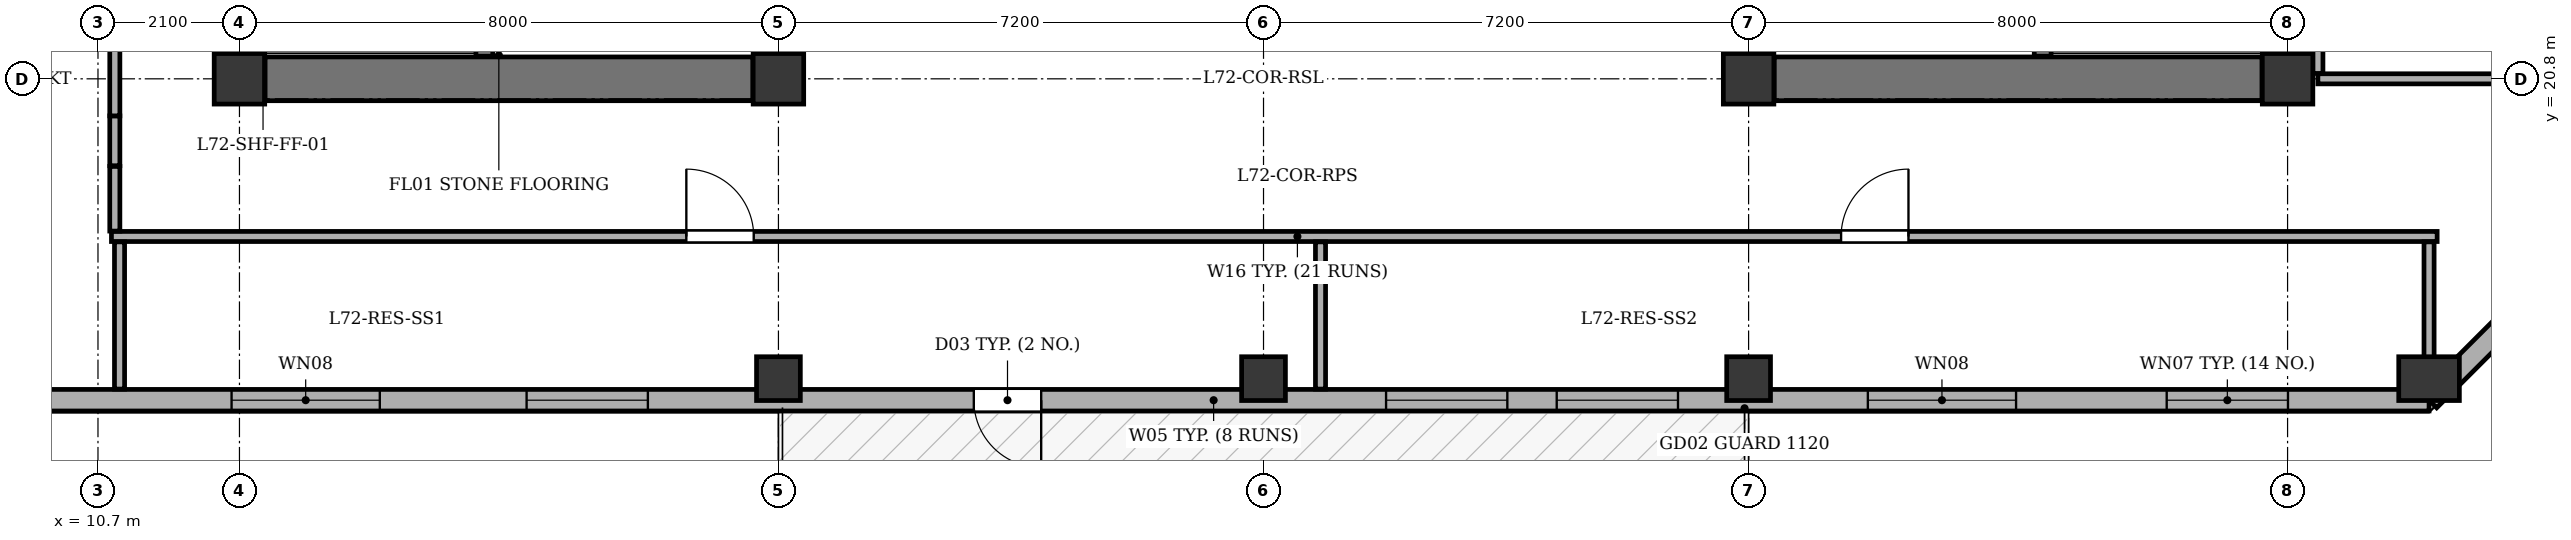
"""IFC4 building model, lengths in metres.
Left out: names, types, materials, properties, quantities, classifications, styles, units other than length and angle.
Written with IfcOpenShell. Run it as: python <this file> out.ifc"""

import sys

from ifc_helpers import new_model, si_unit, direction, frame, frame_2d, origin, origin_2d, place, context, subcontext, project, spatial, rectangle, extrude, element, fill, save


model = new_model("IFC4")
c1 = context("Model", 3, precision=1e-05, world=origin(), true_north=direction((0.0, 1.0)))
c2 = subcontext(c1, "Body", "Model", "MODEL_VIEW")
j1 = project(units=[si_unit("LENGTHUNIT", "METRE"), si_unit("PLANEANGLEUNIT", "RADIAN")], contexts=[c1])
p1 = place(None, origin())
s1 = spatial("IfcSite", under=j1, at=p1, CompositionType="ELEMENT")
p2 = place(p1, origin())
s2 = spatial("IfcBuilding", under=s1, at=p2, CompositionType="ELEMENT")
p3 = place(p2, frame((0.0, 0.0, 272.1)))
s3 = spatial("IfcBuildingStorey", under=s2, at=p3, CompositionType="ELEMENT", Elevation=272.1)
for number, where, z_axis, x_axis in (
    (1, (12.8, 20.8, 0.0), (0.0, 0.0, 1.0), (1.0, 0.0, 0.0)),
    (2, (20.8, 20.8, 0.0), (0.0, 0.0, 1.0), (1.0, 0.0, 0.0)),
    (3, (35.2, 20.8, 0.0), (0.0, 0.0, 1.0), (1.0, 0.0, 0.0)),
    (4, (43.2, 20.8, 0.0), (0.0, 0.0, 1.0), (1.0, 0.0, 0.0)),
):
    element("IfcColumn", number, at=place(p3, frame(where, z_axis=z_axis, x_axis=x_axis)), inside=s3, PredefinedType="COLUMN", context=c2, shape_type="SweptSolid", body=[
        extrude(rectangle(XDim=0.75, YDim=0.75, at=origin_2d()), origin(), (0.0, 0.0, 1.0), 3.4),
    ])
for number, where, z_axis, x_axis in (
    (5, (20.8, 16.35, 0.0), (0.0, 0.0, 1.0), (1.0, 0.0, 0.0)),
    (6, (28.0, 16.35, 0.0), (0.0, 0.0, 1.0), (1.0, 0.0, 0.0)),
    (7, (35.2, 16.35, 0.0), (0.0, 0.0, 1.0), (1.0, 0.0, 0.0)),
):
    element("IfcColumn", number, at=place(p3, frame(where, z_axis=z_axis, x_axis=x_axis)), inside=s3, PredefinedType="COLUMN", context=c2, shape_type="SweptSolid", body=[
        extrude(rectangle(XDim=0.65, YDim=0.65, at=origin_2d()), origin(), (0.0, 0.0, 1.0), 3.4),
    ])
p4 = place(p3, frame((45.3, 16.35, 0.0), z_axis=(0.0, 0.0, 1.0), x_axis=(1.0, 0.0, 0.0)))
e8 = element("IfcColumn", 8, at=p4, inside=s3, PredefinedType="COLUMN", context=c2, shape_type="SweptSolid", body=[
    extrude(rectangle(XDim=0.65, YDim=0.9, at=origin_2d()), origin(), (0.0, 0.0, 1.0), 3.4),
])
p5 = place(p3, frame((45.3, 16.03, 0.0), z_axis=(0.0, 0.0, 1.0), x_axis=(-1.0, 0.0, 0.0)))
e9 = element("IfcWall", 9, at=p5, inside=s3, PredefinedType="STANDARD", context=c2, shape_type="SweptSolid", body=[
    extrude(rectangle(XDim=37.0, YDim=0.32, at=frame_2d((18.5, 0.0))), origin(), (0.0, 0.0, 1.0), 2.725),
])
p6 = place(p5, frame((20.6, 0.0, 0.0)))
e10 = element("IfcOpeningElement", 10, at=p6, cuts=e9, PredefinedType="OPENING", context=c2, shape_type="SweptSolid", body=[
    extrude(rectangle(XDim=1.0, YDim=2.02, at=frame_2d((0.5, 1.01))), frame((0.0, 0.17, 0.0), z_axis=(0.0, -1.0, 0.0), x_axis=(1.0, 0.0, 0.0)), (0.0, 0.0, 1.0), 0.34),
])
p7 = place(p5, frame((2.094, 0.0, 0.75)))
e11 = element("IfcOpeningElement", 11, at=p7, cuts=e9, PredefinedType="OPENING", context=c2, shape_type="SweptSolid", body=[
    extrude(rectangle(XDim=1.8, YDim=1.7, at=frame_2d((0.9, 0.85))), frame((0.0, 0.17, 0.0), z_axis=(0.0, -1.0, 0.0), x_axis=(1.0, 0.0, 0.0)), (0.0, 0.0, 1.0), 0.34),
])
p8 = place(p5, frame((6.13, 0.0, 0.75)))
e12 = element("IfcOpeningElement", 12, at=p8, cuts=e9, PredefinedType="OPENING", context=c2, shape_type="SweptSolid", body=[
    extrude(rectangle(XDim=2.2, YDim=1.7, at=frame_2d((1.1, 0.85))), frame((0.0, 0.17, 0.0), z_axis=(0.0, -1.0, 0.0), x_axis=(1.0, 0.0, 0.0)), (0.0, 0.0, 1.0), 0.34),
])
p9 = place(p5, frame((11.148, 0.0, 0.75)))
e13 = element("IfcOpeningElement", 13, at=p9, cuts=e9, PredefinedType="OPENING", context=c2, shape_type="SweptSolid", body=[
    extrude(rectangle(XDim=1.8, YDim=1.7, at=frame_2d((0.9, 0.85))), frame((0.0, 0.17, 0.0), z_axis=(0.0, -1.0, 0.0), x_axis=(1.0, 0.0, 0.0)), (0.0, 0.0, 1.0), 0.34),
])
p10 = place(p5, frame((13.681, 0.0, 0.75)))
e14 = element("IfcOpeningElement", 14, at=p10, cuts=e9, PredefinedType="OPENING", context=c2, shape_type="SweptSolid", body=[
    extrude(rectangle(XDim=1.8, YDim=1.7, at=frame_2d((0.9, 0.85))), frame((0.0, 0.17, 0.0), z_axis=(0.0, -1.0, 0.0), x_axis=(1.0, 0.0, 0.0)), (0.0, 0.0, 1.0), 0.34),
])
p11 = place(p5, frame((26.438, 0.0, 0.75)))
e15 = element("IfcOpeningElement", 15, at=p11, cuts=e9, PredefinedType="OPENING", context=c2, shape_type="SweptSolid", body=[
    extrude(rectangle(XDim=1.8, YDim=1.7, at=frame_2d((0.9, 0.85))), frame((0.0, 0.17, 0.0), z_axis=(0.0, -1.0, 0.0), x_axis=(1.0, 0.0, 0.0)), (0.0, 0.0, 1.0), 0.34),
])
p12 = place(p5, frame((30.417, 0.0, 0.75)))
e16 = element("IfcOpeningElement", 16, at=p12, cuts=e9, PredefinedType="OPENING", context=c2, shape_type="SweptSolid", body=[
    extrude(rectangle(XDim=2.2, YDim=1.7, at=frame_2d((1.1, 0.85))), frame((0.0, 0.17, 0.0), z_axis=(0.0, -1.0, 0.0), x_axis=(1.0, 0.0, 0.0)), (0.0, 0.0, 1.0), 0.34),
])
p13 = place(p3, frame((49.12, 19.85, 0.0), z_axis=(0.0, 0.0, 1.0), x_axis=(-0.707106781187, -0.707106781187, 0.0)))
e17 = element("IfcWall", 17, at=p13, inside=s3, PredefinedType="STANDARD", context=c2, shape_type="SweptSolid", body=[
    extrude(rectangle(XDim=5.402, YDim=0.32, at=frame_2d((2.701, 0.0))), origin(), (0.0, 0.0, 1.0), 2.725),
])
p14 = place(p13, frame((2.001, 0.0, 0.75)))
e18 = element("IfcOpeningElement", 18, at=p14, cuts=e17, PredefinedType="OPENING", context=c2, shape_type="SweptSolid", body=[
    extrude(rectangle(XDim=1.4, YDim=1.65, at=frame_2d((0.7, 0.825))), frame((0.0, 0.17, 0.0), z_axis=(0.0, -1.0, 0.0), x_axis=(1.0, 0.0, 0.0)), (0.0, 0.0, 1.0), 0.34),
])
p15 = place(p3, frame((12.8, 21.18, 0.0), z_axis=(0.0, 0.0, 1.0), x_axis=(0.0, 1.0, 0.0)))
e19 = element("IfcWall", 19, at=p15, inside=s3, PredefinedType="SHEAR", context=c2, shape_type="SweptSolid", body=[
    extrude(rectangle(XDim=12.04, YDim=0.65, at=frame_2d((6.02, 0.0))), origin(), (0.0, 0.0, 1.0), 3.1),
])
p16 = place(p3, frame((13.18, 20.8, 0.0), z_axis=(0.0, 0.0, 1.0), x_axis=(1.0, 0.0, 0.0)))
e20 = element("IfcWall", 20, at=p16, inside=s3, PredefinedType="SHEAR", context=c2, shape_type="SweptSolid", body=[
    extrude(rectangle(XDim=7.24, YDim=0.65, at=frame_2d((3.62, 0.0))), origin(), (0.0, 0.0, 1.0), 3.1),
])
p17 = place(p3, frame((20.8, 21.18, 0.0), z_axis=(0.0, 0.0, 1.0), x_axis=(0.0, 1.0, 0.0)))
e21 = element("IfcWall", 21, at=p17, inside=s3, PredefinedType="SHEAR", context=c2, shape_type="SweptSolid", body=[
    extrude(rectangle(XDim=3.87, YDim=0.65, at=frame_2d((1.935, 0.0))), origin(), (0.0, 0.0, 1.0), 3.1),
])
p18 = place(p17, frame((1.42, 0.0, 0.0)))
e22 = element("IfcOpeningElement", 22, at=p18, cuts=e21, PredefinedType="OPENING", context=c2, shape_type="SweptSolid", body=[
    extrude(rectangle(XDim=1.2, YDim=2.15, at=frame_2d((0.6, 1.075))), frame((0.0, 0.335, 0.0), z_axis=(0.0, -1.0, 0.0), x_axis=(1.0, 0.0, 0.0)), (0.0, 0.0, 1.0), 0.67),
])
p19 = place(p3, frame((16.435, 21.135, 0.0), z_axis=(0.0, 0.0, 1.0), x_axis=(0.0, 1.0, 0.0)))
e23 = element("IfcWall", 23, at=p19, inside=s3, PredefinedType="SHEAR", context=c2, shape_type="SweptSolid", body=[
    extrude(rectangle(XDim=12.13, YDim=0.25, at=frame_2d((6.065, 0.0))), origin(), (0.0, 0.0, 1.0), 3.1),
])
p20 = place(p19, frame((0.515, 0.0, 0.0)))
e24 = element("IfcOpeningElement", 24, at=p20, cuts=e23, PredefinedType="OPENING", context=c2, shape_type="SweptSolid", body=[
    extrude(rectangle(XDim=1.2, YDim=2.15, at=frame_2d((0.6, 1.075))), frame((0.0, 0.135, 0.0), z_axis=(0.0, -1.0, 0.0), x_axis=(1.0, 0.0, 0.0)), (0.0, 0.0, 1.0), 0.27),
])
p21 = place(p19, frame((2.665, 0.0, 0.0)))
e25 = element("IfcOpeningElement", 25, at=p21, cuts=e23, PredefinedType="OPENING", context=c2, shape_type="SweptSolid", body=[
    extrude(rectangle(XDim=1.15, YDim=2.15, at=frame_2d((0.575, 1.075))), frame((0.0, 0.135, 0.0), z_axis=(0.0, -1.0, 0.0), x_axis=(1.0, 0.0, 0.0)), (0.0, 0.0, 1.0), 0.27),
])
p22 = place(p3, frame((43.2, 21.18, 0.0), z_axis=(0.0, 0.0, 1.0), x_axis=(0.0, 1.0, 0.0)))
e26 = element("IfcWall", 26, at=p22, inside=s3, PredefinedType="SHEAR", context=c2, shape_type="SweptSolid", body=[
    extrude(rectangle(XDim=12.04, YDim=0.65, at=frame_2d((6.02, 0.0))), origin(), (0.0, 0.0, 1.0), 3.1),
])
p23 = place(p3, frame((35.58, 20.8, 0.0), z_axis=(0.0, 0.0, 1.0), x_axis=(1.0, 0.0, 0.0)))
e27 = element("IfcWall", 27, at=p23, inside=s3, PredefinedType="SHEAR", context=c2, shape_type="SweptSolid", body=[
    extrude(rectangle(XDim=7.24, YDim=0.65, at=frame_2d((3.62, 0.0))), origin(), (0.0, 0.0, 1.0), 3.1),
])
p24 = place(p3, frame((35.2, 21.18, 0.0), z_axis=(0.0, 0.0, 1.0), x_axis=(0.0, 1.0, 0.0)))
e28 = element("IfcWall", 28, at=p24, inside=s3, PredefinedType="SHEAR", context=c2, shape_type="SweptSolid", body=[
    extrude(rectangle(XDim=3.87, YDim=0.65, at=frame_2d((1.935, 0.0))), origin(), (0.0, 0.0, 1.0), 3.1),
])
p25 = place(p24, frame((1.42, 0.0, 0.0)))
e29 = element("IfcOpeningElement", 29, at=p25, cuts=e28, PredefinedType="OPENING", context=c2, shape_type="SweptSolid", body=[
    extrude(rectangle(XDim=1.2, YDim=2.15, at=frame_2d((0.6, 1.075))), frame((0.0, 0.335, 0.0), z_axis=(0.0, -1.0, 0.0), x_axis=(1.0, 0.0, 0.0)), (0.0, 0.0, 1.0), 0.67),
])
p26 = place(p3, frame((39.565, 21.135, 0.0), z_axis=(0.0, 0.0, 1.0), x_axis=(0.0, 1.0, 0.0)))
e30 = element("IfcWall", 30, at=p26, inside=s3, PredefinedType="SHEAR", context=c2, shape_type="SweptSolid", body=[
    extrude(rectangle(XDim=12.13, YDim=0.25, at=frame_2d((6.065, 0.0))), origin(), (0.0, 0.0, 1.0), 3.1),
])
p27 = place(p26, frame((0.515, 0.0, 0.0)))
e31 = element("IfcOpeningElement", 31, at=p27, cuts=e30, PredefinedType="OPENING", context=c2, shape_type="SweptSolid", body=[
    extrude(rectangle(XDim=1.2, YDim=2.15, at=frame_2d((0.6, 1.075))), frame((0.0, 0.135, 0.0), z_axis=(0.0, -1.0, 0.0), x_axis=(1.0, 0.0, 0.0)), (0.0, 0.0, 1.0), 0.27),
])
p28 = place(p26, frame((2.665, 0.0, 0.0)))
e32 = element("IfcOpeningElement", 32, at=p28, cuts=e30, PredefinedType="OPENING", context=c2, shape_type="SweptSolid", body=[
    extrude(rectangle(XDim=1.15, YDim=2.15, at=frame_2d((0.575, 1.075))), frame((0.0, 0.135, 0.0), z_axis=(0.0, -1.0, 0.0), x_axis=(1.0, 0.0, 0.0)), (0.0, 0.0, 1.0), 0.27),
])
p29 = place(p3, frame((10.9, 18.46, 0.0), z_axis=(0.0, 0.0, 1.0), x_axis=(1.0, 0.0, 0.0)))
e33 = element("IfcWall", 33, at=p29, inside=s3, PredefinedType="PARTITIONING", context=c2, shape_type="SweptSolid", body=[
    extrude(rectangle(XDim=34.52, YDim=0.15, at=frame_2d((17.26, 0.0))), origin(), (0.0, 0.0, 1.0), 3.1),
])
p30 = place(p29, frame((8.533, 0.0, 0.0)))
e34 = element("IfcOpeningElement", 34, at=p30, cuts=e33, PredefinedType="OPENING", context=c2, shape_type="SweptSolid", body=[
    extrude(rectangle(XDim=1.0, YDim=2.1, at=frame_2d((0.5, 1.05))), frame((0.0, 0.085, 0.0), z_axis=(0.0, -1.0, 0.0), x_axis=(1.0, 0.0, 0.0)), (0.0, 0.0, 1.0), 0.17),
])
p31 = place(p29, frame((25.673, 0.0, 0.0)))
e35 = element("IfcOpeningElement", 35, at=p31, cuts=e33, PredefinedType="OPENING", context=c2, shape_type="SweptSolid", body=[
    extrude(rectangle(XDim=1.0, YDim=2.1, at=frame_2d((0.5, 1.05))), frame((0.0, 0.085, 0.0), z_axis=(0.0, -1.0, 0.0), x_axis=(1.0, 0.0, 0.0)), (0.0, 0.0, 1.0), 0.17),
])
for number, where, z_axis, x_axis in (
    (36, (11.02, 16.195, 0.0), (0.0, 0.0, 1.0), (0.0, 1.0, 0.0)),
    (37, (28.846, 16.195, 0.0), (0.0, 0.0, 1.0), (0.0, 1.0, 0.0)),
    (38, (45.3, 16.195, 0.0), (0.0, 0.0, 1.0), (0.0, 1.0, 0.0)),
):
    element("IfcWall", number, at=place(p3, frame(where, z_axis=z_axis, x_axis=x_axis)), inside=s3, PredefinedType="PARTITIONING", context=c2, shape_type="SweptSolid", body=[
        extrude(rectangle(XDim=2.185, YDim=0.15, at=frame_2d((1.092, 0.0))), origin(), (0.0, 0.0, 1.0), 3.1),
    ])
p32 = place(p3, frame((10.95, 19.5, 0.0), z_axis=(0.0, 0.0, 1.0), x_axis=(0.0, -1.0, 0.0)))
e39 = element("IfcWall", 39, at=p32, inside=s3, PredefinedType="PARTITIONING", context=c2, shape_type="SweptSolid", body=[
    extrude(rectangle(XDim=0.96, YDim=0.15, at=frame_2d((0.48, 0.0))), origin(), (0.0, 0.0, 1.0), 3.1),
])
p33 = place(p3, frame((10.95, 19.51, 0.0), z_axis=(0.0, 0.0, 1.0), x_axis=(0.0, 1.0, 0.0)))
e40 = element("IfcWall", 40, at=p33, inside=s3, PredefinedType="PARTITIONING", context=c2, shape_type="SweptSolid", body=[
    extrude(rectangle(XDim=0.74, YDim=0.15, at=frame_2d((0.37, 0.0))), origin(), (0.0, 0.0, 1.0), 3.1),
])
p34 = place(p3, frame((10.95, 20.25, 0.0), z_axis=(0.0, 0.0, 1.0), x_axis=(0.0, 1.0, 0.0)))
e41 = element("IfcWall", 41, at=p34, inside=s3, PredefinedType="PARTITIONING", context=c2, shape_type="SweptSolid", body=[
    extrude(rectangle(XDim=13.9, YDim=0.15, at=frame_2d((6.95, 0.0))), origin(), (0.0, 0.0, 1.0), 3.1),
])
p35 = place(p3, frame((43.65, 20.8, 0.0), z_axis=(0.0, 0.0, 1.0), x_axis=(1.0, 0.0, 0.0)))
e42 = element("IfcWall", 42, at=p35, inside=s3, PredefinedType="PARTITIONING", context=c2, shape_type="SweptSolid", body=[
    extrude(rectangle(XDim=5.305, YDim=0.15, at=frame_2d((2.653, 0.0))), origin(), (0.0, 0.0, 1.0), 2.535),
])
p36 = place(p3, frame((43.65, 20.88, 0.0), z_axis=(0.0, 0.0, 1.0), x_axis=(0.0, 1.0, 0.0)))
e43 = element("IfcWall", 43, at=p36, inside=s3, PredefinedType="PARTITIONING", context=c2, shape_type="SweptSolid", body=[
    extrude(rectangle(XDim=13.27, YDim=0.15, at=frame_2d((6.635, 0.0))), origin(), (0.0, 0.0, 1.0), 3.1),
])
p37 = place(p6, origin())
e44 = element("IfcDoor", 44, at=p37, inside=s3, OperationType="SINGLE_SWING_LEFT", PredefinedType="DOOR", context=c2, shape_type="SweptSolid", body=[
    extrude(rectangle(XDim=1.0, YDim=2.02, at=frame_2d((0.5, 1.01))), frame((0.0, 0.025, 0.0), z_axis=(0.0, -1.0, 0.0), x_axis=(1.0, 0.0, 0.0)), (0.0, 0.0, 1.0), 0.05),
])
fill(e10, e44)
p38 = place(p7, origin())
e45 = element("IfcWindow", 45, at=p38, inside=s3, PartitioningType="SINGLE_PANEL", PredefinedType="WINDOW", context=c2, shape_type="SweptSolid", body=[
    extrude(rectangle(XDim=1.8, YDim=1.7, at=frame_2d((0.9, 0.85))), frame((0.0, -0.01, 0.0), z_axis=(0.0, -1.0, 0.0), x_axis=(1.0, 0.0, 0.0)), (0.0, 0.0, 1.0), 0.06),
])
fill(e11, e45)
p39 = place(p8, origin())
e46 = element("IfcWindow", 46, at=p39, inside=s3, PartitioningType="SINGLE_PANEL", PredefinedType="WINDOW", context=c2, shape_type="SweptSolid", body=[
    extrude(rectangle(XDim=2.2, YDim=1.7, at=frame_2d((1.1, 0.85))), frame((0.0, -0.01, 0.0), z_axis=(0.0, -1.0, 0.0), x_axis=(1.0, 0.0, 0.0)), (0.0, 0.0, 1.0), 0.06),
])
fill(e12, e46)
p40 = place(p9, origin())
e47 = element("IfcWindow", 47, at=p40, inside=s3, PartitioningType="SINGLE_PANEL", PredefinedType="WINDOW", context=c2, shape_type="SweptSolid", body=[
    extrude(rectangle(XDim=1.8, YDim=1.7, at=frame_2d((0.9, 0.85))), frame((0.0, -0.01, 0.0), z_axis=(0.0, -1.0, 0.0), x_axis=(1.0, 0.0, 0.0)), (0.0, 0.0, 1.0), 0.06),
])
fill(e13, e47)
p41 = place(p10, origin())
e48 = element("IfcWindow", 48, at=p41, inside=s3, PartitioningType="SINGLE_PANEL", PredefinedType="WINDOW", context=c2, shape_type="SweptSolid", body=[
    extrude(rectangle(XDim=1.8, YDim=1.7, at=frame_2d((0.9, 0.85))), frame((0.0, -0.01, 0.0), z_axis=(0.0, -1.0, 0.0), x_axis=(1.0, 0.0, 0.0)), (0.0, 0.0, 1.0), 0.06),
])
fill(e14, e48)
p42 = place(p11, origin())
e49 = element("IfcWindow", 49, at=p42, inside=s3, PartitioningType="SINGLE_PANEL", PredefinedType="WINDOW", context=c2, shape_type="SweptSolid", body=[
    extrude(rectangle(XDim=1.8, YDim=1.7, at=frame_2d((0.9, 0.85))), frame((0.0, -0.01, 0.0), z_axis=(0.0, -1.0, 0.0), x_axis=(1.0, 0.0, 0.0)), (0.0, 0.0, 1.0), 0.06),
])
fill(e15, e49)
p43 = place(p12, origin())
e50 = element("IfcWindow", 50, at=p43, inside=s3, PartitioningType="SINGLE_PANEL", PredefinedType="WINDOW", context=c2, shape_type="SweptSolid", body=[
    extrude(rectangle(XDim=2.2, YDim=1.7, at=frame_2d((1.1, 0.85))), frame((0.0, -0.01, 0.0), z_axis=(0.0, -1.0, 0.0), x_axis=(1.0, 0.0, 0.0)), (0.0, 0.0, 1.0), 0.06),
])
fill(e16, e50)
p44 = place(p30, origin())
e51 = element("IfcDoor", 51, at=p44, inside=s3, OperationType="SINGLE_SWING_LEFT", PredefinedType="DOOR", context=c2, shape_type="SweptSolid", body=[
    extrude(rectangle(XDim=1.0, YDim=2.1, at=frame_2d((0.5, 1.05))), frame((0.0, 0.025, 0.0), z_axis=(0.0, -1.0, 0.0), x_axis=(1.0, 0.0, 0.0)), (0.0, 0.0, 1.0), 0.05),
])
fill(e34, e51)
p45 = place(p31, origin())
e52 = element("IfcDoor", 52, at=p45, inside=s3, OperationType="SINGLE_SWING_RIGHT", PredefinedType="DOOR", context=c2, shape_type="SweptSolid", body=[
    extrude(rectangle(XDim=1.0, YDim=2.1, at=frame_2d((0.5, 1.05))), frame((0.0, 0.025, 0.0), z_axis=(0.0, -1.0, 0.0), x_axis=(1.0, 0.0, 0.0)), (0.0, 0.0, 1.0), 0.05),
])
fill(e35, e52)
save(model, sys.argv[1])
